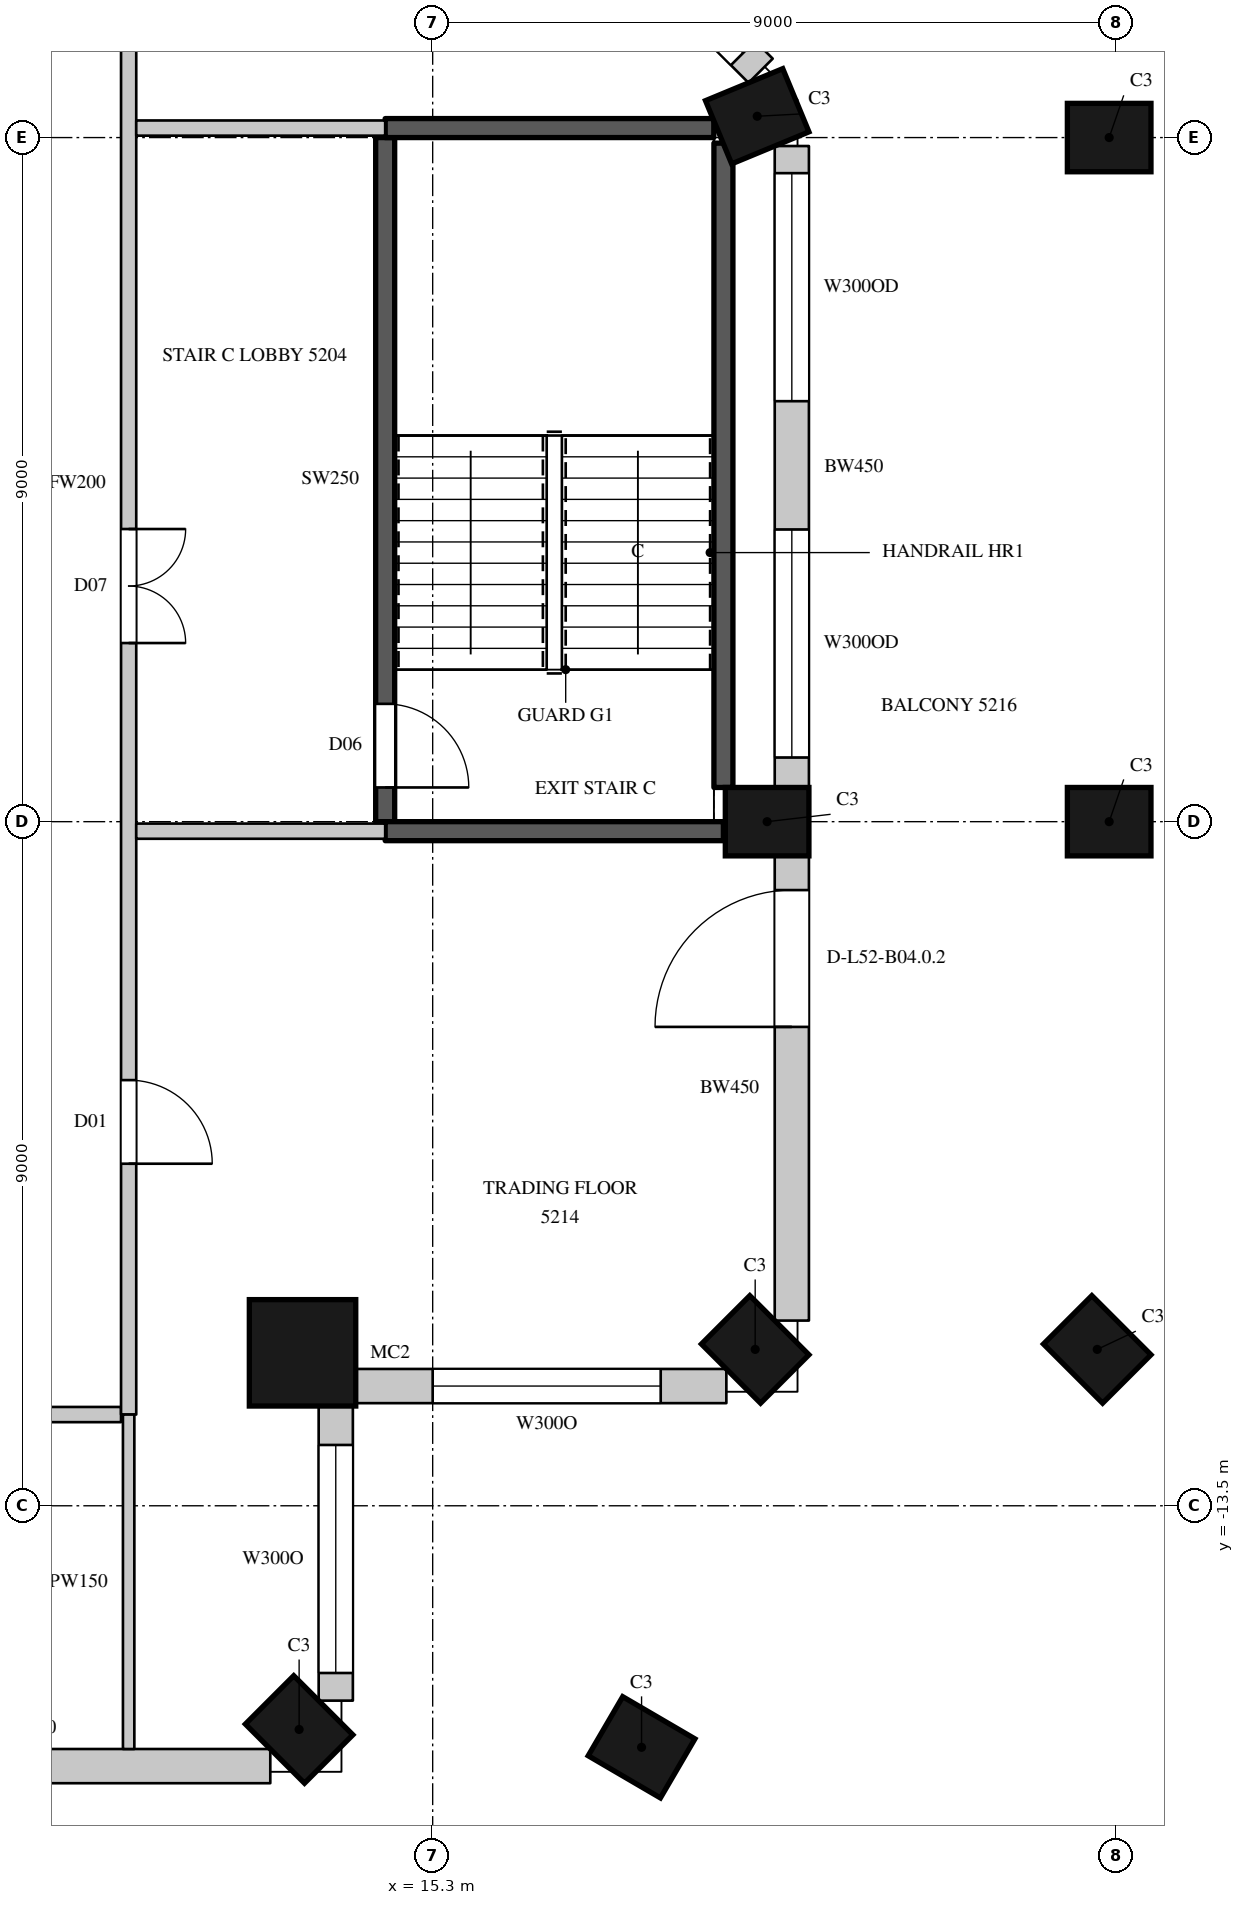
"""IFC4 building model, lengths in metres.
Left out: names, types, materials, properties, quantities, classifications, styles, units other than length and angle.
Written with IfcOpenShell. Run it as: python <this file> out.ifc"""

import sys

from ifc_helpers import new_model, si_unit, direction, frame, frame_2d, origin, origin_2d, place, context, subcontext, project, spatial, rectangle, circle, extrude, element, fill, save


model = new_model("IFC4")
c1 = context("Model", 3, precision=1e-05, world=origin(), true_north=direction((0.0, 1.0)))
c2 = subcontext(c1, "Body", "Model", "MODEL_VIEW")
j1 = project(units=[si_unit("LENGTHUNIT", "METRE"), si_unit("PLANEANGLEUNIT", "RADIAN")], contexts=[c1])
p1 = place(None, origin())
s1 = spatial("IfcSite", under=j1, at=p1, CompositionType="ELEMENT")
p2 = place(p1, origin())
s2 = spatial("IfcBuilding", under=s1, at=p2, CompositionType="ELEMENT")
p3 = place(p2, frame((0.0, 0.0, 234.3)))
s3 = spatial("IfcBuildingStorey", under=s2, at=p3, CompositionType="ELEMENT", Elevation=234.3)
p4 = place(p3, frame((13.543, -16.443, 0.0), z_axis=(0.0, 0.0, 1.0), x_axis=(0.707106781187, 0.707106781187, 0.0)))
e1 = element("IfcColumn", 1, at=p4, inside=s3, PredefinedType="COLUMN", context=c2, shape_type="SweptSolid", body=[
    extrude(rectangle(XDim=0.9, YDim=1.1, at=origin_2d()), origin(), (0.0, 0.0, 1.0), 4.1),
])
p5 = place(p3, frame((13.588, -11.488, 0.0), z_axis=(0.0, 0.0, 1.0), x_axis=(1.0, 0.0, 0.0)))
e2 = element("IfcColumn", 2, at=p5, inside=s3, PredefinedType="COLUMN", context=c2, shape_type="SweptSolid", body=[
    extrude(circle(Radius=0.7, at=origin_2d()), origin(), (0.0, 0.0, 1.0), 4.1),
])
for number, where, z_axis, x_axis in (
    (3, (19.543, -11.443, 0.0), (0.0, 0.0, 1.0), (0.707, 0.707, 0.0)),
    (4, (19.7, -4.5, 0.0), (0.0, 0.0, 1.0), (0.0, 1.0, 0.0)),
    (5, (19.57, 4.78, 0.0), (0.0, 0.0, 1.0), (-0.383, 0.924, 0.0)),
    (6, (18.048, -16.677, 0.0), (0.0, 0.0, 1.0), (0.504, 0.863, 0.0)),
    (7, (24.043, -11.443, 0.0), (0.0, 0.0, 1.0), (0.707, 0.707, 0.0)),
    (8, (24.2, -4.5, 0.0), (0.0, 0.0, 1.0), (0.0, 1.0, 0.0)),
    (9, (24.2, 4.5, 0.0), (0.0, 0.0, 1.0), (0.0, 1.0, 0.0)),
):
    element("IfcColumn", number, at=place(p3, frame(where, z_axis=z_axis, x_axis=x_axis)), inside=s3, PredefinedType="COLUMN", context=c2, shape_type="SweptSolid", body=[
        extrude(rectangle(XDim=0.9, YDim=1.1, at=origin_2d()), origin(), (0.0, 0.0, 1.0), 4.1),
    ])
p6 = place(p3, frame((6.75, -16.925, 0.0), z_axis=(0.0, 0.0, 1.0), x_axis=(1.0, 0.0, 0.0)))
e10 = element("IfcWall", 10, at=p6, inside=s3, PredefinedType="SOLIDWALL", context=c2, shape_type="SweptSolid", body=[
    extrude(rectangle(XDim=6.414, YDim=0.45, at=frame_2d((3.207, 0.0))), origin(), (0.0, 0.0, 1.0), 3.8),
])
p7 = place(p6, frame((0.525, 0.0, 0.0)))
e11 = element("IfcOpeningElement", 11, at=p7, cuts=e10, PredefinedType="OPENING", context=c2, shape_type="SweptSolid", body=[
    extrude(rectangle(XDim=1.8, YDim=2.4, at=frame_2d((0.9, 1.2))), frame((0.0, 0.235, 0.0), z_axis=(0.0, -1.0, 0.0), x_axis=(1.0, 0.0, 0.0)), (0.0, 0.0, 1.0), 0.47),
])
p8 = place(p3, frame((14.025, -16.064, 0.0), z_axis=(0.0, 0.0, 1.0), x_axis=(0.0, 1.0, 0.0)))
e12 = element("IfcWall", 12, at=p8, inside=s3, PredefinedType="SOLIDWALL", context=c2, shape_type="SweptSolid", body=[
    extrude(rectangle(XDim=3.909, YDim=0.45, at=frame_2d((1.955, 0.0))), origin(), (0.0, 0.0, 1.0), 3.8),
])
p9 = place(p8, frame((0.364, 0.0, 1.05)))
e13 = element("IfcOpeningElement", 13, at=p9, cuts=e12, PredefinedType="OPENING", context=c2, shape_type="SweptSolid", body=[
    extrude(rectangle(XDim=3.0, YDim=2.4, at=frame_2d((1.5, 1.2))), frame((0.0, 0.235, 0.0), z_axis=(0.0, -1.0, 0.0), x_axis=(1.0, 0.0, 0.0)), (0.0, 0.0, 1.0), 0.47),
])
p10 = place(p3, frame((14.255, -11.925, 0.0), z_axis=(0.0, 0.0, 1.0), x_axis=(1.0, 0.0, 0.0)))
e14 = element("IfcWall", 14, at=p10, inside=s3, PredefinedType="SOLIDWALL", context=c2, shape_type="SweptSolid", body=[
    extrude(rectangle(XDim=4.909, YDim=0.45, at=frame_2d((2.455, 0.0))), origin(), (0.0, 0.0, 1.0), 3.8),
])
p11 = place(p10, frame((1.045, 0.0, 1.05)))
e15 = element("IfcOpeningElement", 15, at=p11, cuts=e14, PredefinedType="OPENING", context=c2, shape_type="SweptSolid", body=[
    extrude(rectangle(XDim=3.0, YDim=2.4, at=frame_2d((1.5, 1.2))), frame((0.0, 0.235, 0.0), z_axis=(0.0, -1.0, 0.0), x_axis=(1.0, 0.0, 0.0)), (0.0, 0.0, 1.0), 0.47),
])
p12 = place(p3, frame((20.025, -11.064, 0.0), z_axis=(0.0, 0.0, 1.0), x_axis=(0.0, 1.0, 0.0)))
e16 = element("IfcWall", 16, at=p12, inside=s3, PredefinedType="SOLIDWALL", context=c2, shape_type="SweptSolid", body=[
    extrude(rectangle(XDim=6.114, YDim=0.45, at=frame_2d((3.057, 0.0))), origin(), (0.0, 0.0, 1.0), 3.8),
])
p13 = place(p12, frame((3.864, 0.0, 0.0)))
e17 = element("IfcOpeningElement", 17, at=p13, cuts=e16, PredefinedType="OPENING", context=c2, shape_type="SweptSolid", body=[
    extrude(rectangle(XDim=1.8, YDim=2.4, at=frame_2d((0.9, 1.2))), frame((0.0, 0.235, 0.0), z_axis=(0.0, -1.0, 0.0), x_axis=(1.0, 0.0, 0.0)), (0.0, 0.0, 1.0), 0.47),
])
p14 = place(p3, frame((20.025, -4.05, 0.0), z_axis=(0.0, 0.0, 1.0), x_axis=(0.0, 1.0, 0.0)))
e18 = element("IfcWall", 18, at=p14, inside=s3, PredefinedType="SOLIDWALL", context=c2, shape_type="SweptSolid", body=[
    extrude(rectangle(XDim=8.439, YDim=0.45, at=frame_2d((4.219, 0.0))), origin(), (0.0, 0.0, 1.0), 3.8),
])
p15 = place(p14, frame((0.394, 0.0, 1.05)))
e19 = element("IfcOpeningElement", 19, at=p15, cuts=e18, PredefinedType="OPENING", context=c2, shape_type="SweptSolid", body=[
    extrude(rectangle(XDim=3.0, YDim=2.4, at=frame_2d((1.5, 1.2))), frame((0.0, 0.235, 0.0), z_axis=(0.0, -1.0, 0.0), x_axis=(1.0, 0.0, 0.0)), (0.0, 0.0, 1.0), 0.47),
])
p16 = place(p14, frame((5.082, 0.0, 1.05)))
e20 = element("IfcOpeningElement", 20, at=p16, cuts=e18, PredefinedType="OPENING", context=c2, shape_type="SweptSolid", body=[
    extrude(rectangle(XDim=3.0, YDim=2.4, at=frame_2d((1.5, 1.2))), frame((0.0, 0.235, 0.0), z_axis=(0.0, -1.0, 0.0), x_axis=(1.0, 0.0, 0.0)), (0.0, 0.0, 1.0), 0.47),
])
p17 = place(p3, frame((19.615, 5.379, 0.0), z_axis=(0.0, 0.0, 1.0), x_axis=(-0.707089646058, 0.7071239159, 0.0)))
e21 = element("IfcWall", 21, at=p17, inside=s3, PredefinedType="SOLIDWALL", context=c2, shape_type="SweptSolid", body=[
    extrude(rectangle(XDim=7.124, YDim=0.45, at=frame_2d((3.562, 0.0))), origin(), (0.0, 0.0, 1.0), 3.8),
])
p18 = place(p17, frame((0.328, 0.0, 1.05)))
e22 = element("IfcOpeningElement", 22, at=p18, cuts=e21, PredefinedType="OPENING", context=c2, shape_type="SweptSolid", body=[
    extrude(rectangle(XDim=2.4, YDim=2.4, at=frame_2d((1.2, 1.2))), frame((0.0, 0.235, 0.0), z_axis=(0.0, -1.0, 0.0), x_axis=(1.0, 0.0, 0.0)), (0.0, 0.0, 1.0), 0.47),
])
p19 = place(p17, frame((4.359, 0.0, 1.05)))
e23 = element("IfcOpeningElement", 23, at=p19, cuts=e21, PredefinedType="OPENING", context=c2, shape_type="SweptSolid", body=[
    extrude(rectangle(XDim=2.4, YDim=2.4, at=frame_2d((1.2, 1.2))), frame((0.0, 0.235, 0.0), z_axis=(0.0, -1.0, 0.0), x_axis=(1.0, 0.0, 0.0)), (0.0, 0.0, 1.0), 0.47),
])
p20 = place(p3, frame((21.1, -5.1, 0.0), z_axis=(0.0, 0.0, 1.0), x_axis=(0.0, 1.0, 0.0)))
e24 = element("IfcWall", 24, at=p20, inside=s3, PredefinedType="SOLIDWALL", context=c2, shape_type="SweptSolid", body=[
    extrude(rectangle(XDim=3.583, YDim=0.45, at=frame_2d((1.792, 0.0))), origin(), (0.0, 0.0, 1.0), 0.6),
])
p21 = place(p3, frame((21.1, -0.617, 0.0), z_axis=(0.0, 0.0, 1.0), x_axis=(0.0, 1.0, 0.0)))
e25 = element("IfcWall", 25, at=p21, inside=s3, PredefinedType="SOLIDWALL", context=c2, shape_type="SweptSolid", body=[
    extrude(rectangle(XDim=2.567, YDim=0.45, at=frame_2d((1.283, 0.0))), origin(), (0.0, 0.0, 1.0), 0.6),
])
p22 = place(p3, frame((-10.9, -12.3, 0.0), z_axis=(0.0, 0.0, 1.0), x_axis=(1.0, 0.0, 0.0)))
e26 = element("IfcWall", 26, at=p22, inside=s3, PredefinedType="PARTITIONING", context=c2, shape_type="SweptSolid", body=[
    extrude(rectangle(XDim=22.1, YDim=0.2, at=frame_2d((11.05, 0.0))), origin(), (0.0, 0.0, 1.0), 3.8),
])
p23 = place(p22, frame((1.1, 0.0, 0.0)))
e27 = element("IfcOpeningElement", 27, at=p23, cuts=e26, PredefinedType="OPENING", context=c2, shape_type="SweptSolid", body=[
    extrude(rectangle(XDim=0.9, YDim=2.2, at=frame_2d((0.45, 1.1))), frame((0.0, 0.11, 0.0), z_axis=(0.0, -1.0, 0.0), x_axis=(1.0, 0.0, 0.0)), (0.0, 0.0, 1.0), 0.22),
])
p24 = place(p22, frame((4.9, 0.0, 0.0)))
e28 = element("IfcOpeningElement", 28, at=p24, cuts=e26, PredefinedType="OPENING", context=c2, shape_type="SweptSolid", body=[
    extrude(rectangle(XDim=0.9, YDim=2.2, at=frame_2d((0.45, 1.1))), frame((0.0, 0.11, 0.0), z_axis=(0.0, -1.0, 0.0), x_axis=(1.0, 0.0, 0.0)), (0.0, 0.0, 1.0), 0.22),
])
p25 = place(p22, frame((7.55, 0.0, 0.0)))
e29 = element("IfcOpeningElement", 29, at=p25, cuts=e26, PredefinedType="OPENING", context=c2, shape_type="SweptSolid", body=[
    extrude(rectangle(XDim=0.9, YDim=2.2, at=frame_2d((0.45, 1.1))), frame((0.0, 0.11, 0.0), z_axis=(0.0, -1.0, 0.0), x_axis=(1.0, 0.0, 0.0)), (0.0, 0.0, 1.0), 0.22),
])
p26 = place(p22, frame((9.95, 0.0, 0.0)))
e30 = element("IfcOpeningElement", 30, at=p26, cuts=e26, PredefinedType="OPENING", context=c2, shape_type="SweptSolid", body=[
    extrude(rectangle(XDim=1.1, YDim=2.4, at=frame_2d((0.55, 1.2))), frame((0.0, 0.11, 0.0), z_axis=(0.0, -1.0, 0.0), x_axis=(1.0, 0.0, 0.0)), (0.0, 0.0, 1.0), 0.22),
])
p27 = place(p22, frame((14.4, 0.0, 0.0)))
e31 = element("IfcOpeningElement", 31, at=p27, cuts=e26, PredefinedType="OPENING", context=c2, shape_type="SweptSolid", body=[
    extrude(rectangle(XDim=1.1, YDim=2.4, at=frame_2d((0.55, 1.2))), frame((0.0, 0.11, 0.0), z_axis=(0.0, -1.0, 0.0), x_axis=(1.0, 0.0, 0.0)), (0.0, 0.0, 1.0), 0.22),
])
p28 = place(p22, frame((17.95, 0.0, 0.0)))
e32 = element("IfcOpeningElement", 32, at=p28, cuts=e26, PredefinedType="OPENING", context=c2, shape_type="SweptSolid", body=[
    extrude(rectangle(XDim=1.1, YDim=2.4, at=frame_2d((0.55, 1.2))), frame((0.0, 0.11, 0.0), z_axis=(0.0, -1.0, 0.0), x_axis=(1.0, 0.0, 0.0)), (0.0, 0.0, 1.0), 0.22),
])
p29 = place(p3, frame((11.3, -12.3, 0.0), z_axis=(0.0, 0.0, 1.0), x_axis=(0.0, 1.0, 0.0)))
e33 = element("IfcWall", 33, at=p29, inside=s3, PredefinedType="PARTITIONING", context=c2, shape_type="SweptSolid", body=[
    extrude(rectangle(XDim=24.5, YDim=0.2, at=frame_2d((12.25, 0.0))), origin(), (0.0, 0.0, 1.0), 3.8),
])
p30 = place(p29, frame((10.15, 0.0, 0.0)))
e34 = element("IfcOpeningElement", 34, at=p30, cuts=e33, PredefinedType="OPENING", context=c2, shape_type="SweptSolid", body=[
    extrude(rectangle(XDim=1.5, YDim=2.4, at=frame_2d((0.75, 1.2))), frame((0.0, 0.11, 0.0), z_axis=(0.0, -1.0, 0.0), x_axis=(1.0, 0.0, 0.0)), (0.0, 0.0, 1.0), 0.22),
])
p31 = place(p29, frame((3.3, 0.0, 0.0)))
e35 = element("IfcOpeningElement", 35, at=p31, cuts=e33, PredefinedType="OPENING", context=c2, shape_type="SweptSolid", body=[
    extrude(rectangle(XDim=1.1, YDim=2.4, at=frame_2d((0.55, 1.2))), frame((0.0, 0.11, 0.0), z_axis=(0.0, -1.0, 0.0), x_axis=(1.0, 0.0, 0.0)), (0.0, 0.0, 1.0), 0.22),
])
for number, where, z_axis, x_axis in (
    (36, (11.4, -4.625, 0.0), (0.0, 0.0, 1.0), (1.0, 0.0, 0.0)),
    (37, (11.4, 4.625, 0.0), (0.0, 0.0, 1.0), (1.0, 0.0, 0.0)),
):
    element("IfcWall", number, at=place(p3, frame(where, z_axis=z_axis, x_axis=x_axis)), inside=s3, PredefinedType="PARTITIONING", context=c2, shape_type="SweptSolid", body=[
        extrude(rectangle(XDim=3.275, YDim=0.2, at=frame_2d((1.638, 0.0))), origin(), (0.0, 0.0, 1.0), 3.8),
    ])
p32 = place(p3, frame((11.3, -16.7, 0.0), z_axis=(0.0, 0.0, 1.0), x_axis=(0.0, 1.0, 0.0)))
e38 = element("IfcWall", 38, at=p32, inside=s3, PredefinedType="PARTITIONING", context=c2, shape_type="SweptSolid", body=[
    extrude(rectangle(XDim=4.4, YDim=0.15, at=frame_2d((2.2, 0.0))), origin(), (0.0, 0.0, 1.0), 3.8),
])
p33 = place(p3, frame((14.675, -4.5, 0.0), z_axis=(0.0, 0.0, 1.0), x_axis=(0.0, 1.0, 0.0)))
e39 = element("IfcWall", 39, at=p33, inside=s3, PredefinedType="SHEAR", context=c2, shape_type="SweptSolid", body=[
    extrude(rectangle(XDim=9.0, YDim=0.25, at=frame_2d((4.5, 0.0))), origin(), (0.0, 0.0, 1.0), 3.8),
])
p34 = place(p33, frame((0.45, 0.0, 0.0)))
e40 = element("IfcOpeningElement", 40, at=p34, cuts=e39, PredefinedType="OPENING", context=c2, shape_type="SweptSolid", body=[
    extrude(rectangle(XDim=1.1, YDim=2.2, at=frame_2d((0.55, 1.1))), frame((0.0, 0.135, 0.0), z_axis=(0.0, -1.0, 0.0), x_axis=(1.0, 0.0, 0.0)), (0.0, 0.0, 1.0), 0.27),
])
p35 = place(p3, frame((14.675, -4.625, 0.0), z_axis=(0.0, 0.0, 1.0), x_axis=(1.0, 0.0, 0.0)))
e41 = element("IfcWall", 41, at=p35, inside=s3, PredefinedType="SHEAR", context=c2, shape_type="SweptSolid", body=[
    extrude(rectangle(XDim=4.45, YDim=0.25, at=frame_2d((2.225, 0.0))), origin(), (0.0, 0.0, 1.0), 3.8),
])
p36 = place(p3, frame((14.675, 4.625, 0.0), z_axis=(0.0, 0.0, 1.0), x_axis=(1.0, 0.0, 0.0)))
e42 = element("IfcWall", 42, at=p36, inside=s3, PredefinedType="SHEAR", context=c2, shape_type="SweptSolid", body=[
    extrude(rectangle(XDim=4.324, YDim=0.25, at=frame_2d((2.162, 0.0))), origin(), (0.0, 0.0, 1.0), 3.8),
])
p37 = place(p3, frame((19.125, -4.05, 0.0), z_axis=(0.0, 0.0, 1.0), x_axis=(0.0, 1.0, 0.0)))
e43 = element("IfcWall", 43, at=p37, inside=s3, PredefinedType="SHEAR", context=c2, shape_type="SweptSolid", body=[
    extrude(rectangle(XDim=8.477, YDim=0.25, at=frame_2d((4.238, 0.0))), origin(), (0.0, 0.0, 1.0), 3.8),
])
p38 = place(p9, origin())
e44 = element("IfcWindow", 44, at=p38, inside=s3, PartitioningType="SINGLE_PANEL", PredefinedType="WINDOW", context=c2, shape_type="SweptSolid", body=[
    extrude(rectangle(XDim=3.0, YDim=2.4, at=frame_2d((1.5, 1.2))), frame((0.0, 0.135, 0.0), z_axis=(0.0, -1.0, 0.0), x_axis=(1.0, 0.0, 0.0)), (0.0, 0.0, 1.0), 0.06),
])
fill(e13, e44)
p39 = place(p11, origin())
e45 = element("IfcWindow", 45, at=p39, inside=s3, PartitioningType="SINGLE_PANEL", PredefinedType="WINDOW", context=c2, shape_type="SweptSolid", body=[
    extrude(rectangle(XDim=3.0, YDim=2.4, at=frame_2d((1.5, 1.2))), frame((0.0, 0.135, 0.0), z_axis=(0.0, -1.0, 0.0), x_axis=(1.0, 0.0, 0.0)), (0.0, 0.0, 1.0), 0.06),
])
fill(e15, e45)
p40 = place(p13, origin())
e46 = element("IfcDoor", 46, at=p40, inside=s3, OperationType="SLIDING_TO_LEFT", PredefinedType="DOOR", context=c2, shape_type="SweptSolid", body=[
    extrude(rectangle(XDim=1.8, YDim=2.4, at=frame_2d((0.9, 1.2))), frame((0.0, 0.13, 0.0), z_axis=(0.0, -1.0, 0.0), x_axis=(1.0, 0.0, 0.0)), (0.0, 0.0, 1.0), 0.05),
])
fill(e17, e46)
p41 = place(p15, origin())
e47 = element("IfcWindow", 47, at=p41, inside=s3, PartitioningType="SINGLE_PANEL", PredefinedType="WINDOW", context=c2, shape_type="SweptSolid", body=[
    extrude(rectangle(XDim=3.0, YDim=2.4, at=frame_2d((1.5, 1.2))), frame((0.0, 0.135, 0.0), z_axis=(0.0, -1.0, 0.0), x_axis=(1.0, 0.0, 0.0)), (0.0, 0.0, 1.0), 0.06),
])
fill(e19, e47)
p42 = place(p16, origin())
e48 = element("IfcWindow", 48, at=p42, inside=s3, PartitioningType="SINGLE_PANEL", PredefinedType="WINDOW", context=c2, shape_type="SweptSolid", body=[
    extrude(rectangle(XDim=3.0, YDim=2.4, at=frame_2d((1.5, 1.2))), frame((0.0, 0.135, 0.0), z_axis=(0.0, -1.0, 0.0), x_axis=(1.0, 0.0, 0.0)), (0.0, 0.0, 1.0), 0.06),
])
fill(e20, e48)
p43 = place(p18, origin())
e49 = element("IfcWindow", 49, at=p43, inside=s3, PartitioningType="SINGLE_PANEL", PredefinedType="WINDOW", context=c2, shape_type="SweptSolid", body=[
    extrude(rectangle(XDim=2.4, YDim=2.4, at=frame_2d((1.2, 1.2))), frame((0.0, 0.135, 0.0), z_axis=(0.0, -1.0, 0.0), x_axis=(1.0, 0.0, 0.0)), (0.0, 0.0, 1.0), 0.06),
])
fill(e22, e49)
p44 = place(p30, origin())
e50 = element("IfcDoor", 50, at=p44, inside=s3, OperationType="DOUBLE_DOOR_SINGLE_SWING", PredefinedType="DOOR", context=c2, shape_type="SweptSolid", body=[
    extrude(rectangle(XDim=1.5, YDim=2.4, at=frame_2d((0.75, 1.2))), frame((0.0, 0.025, 0.0), z_axis=(0.0, -1.0, 0.0), x_axis=(1.0, 0.0, 0.0)), (0.0, 0.0, 1.0), 0.05),
])
fill(e34, e50)
p45 = place(p31, origin())
e51 = element("IfcDoor", 51, at=p45, inside=s3, OperationType="SINGLE_SWING_RIGHT", PredefinedType="DOOR", context=c2, shape_type="SweptSolid", body=[
    extrude(rectangle(XDim=1.1, YDim=2.4, at=frame_2d((0.55, 1.2))), frame((0.0, 0.025, 0.0), z_axis=(0.0, -1.0, 0.0), x_axis=(1.0, 0.0, 0.0)), (0.0, 0.0, 1.0), 0.05),
])
fill(e35, e51)
p46 = place(p34, origin())
e52 = element("IfcDoor", 52, at=p46, inside=s3, OperationType="SINGLE_SWING_RIGHT", PredefinedType="DOOR", context=c2, shape_type="SweptSolid", body=[
    extrude(rectangle(XDim=1.1, YDim=2.2, at=frame_2d((0.55, 1.1))), frame((0.0, 0.025, 0.0), z_axis=(0.0, -1.0, 0.0), x_axis=(1.0, 0.0, 0.0)), (0.0, 0.0, 1.0), 0.05),
])
fill(e40, e52)
save(model, sys.argv[1])
